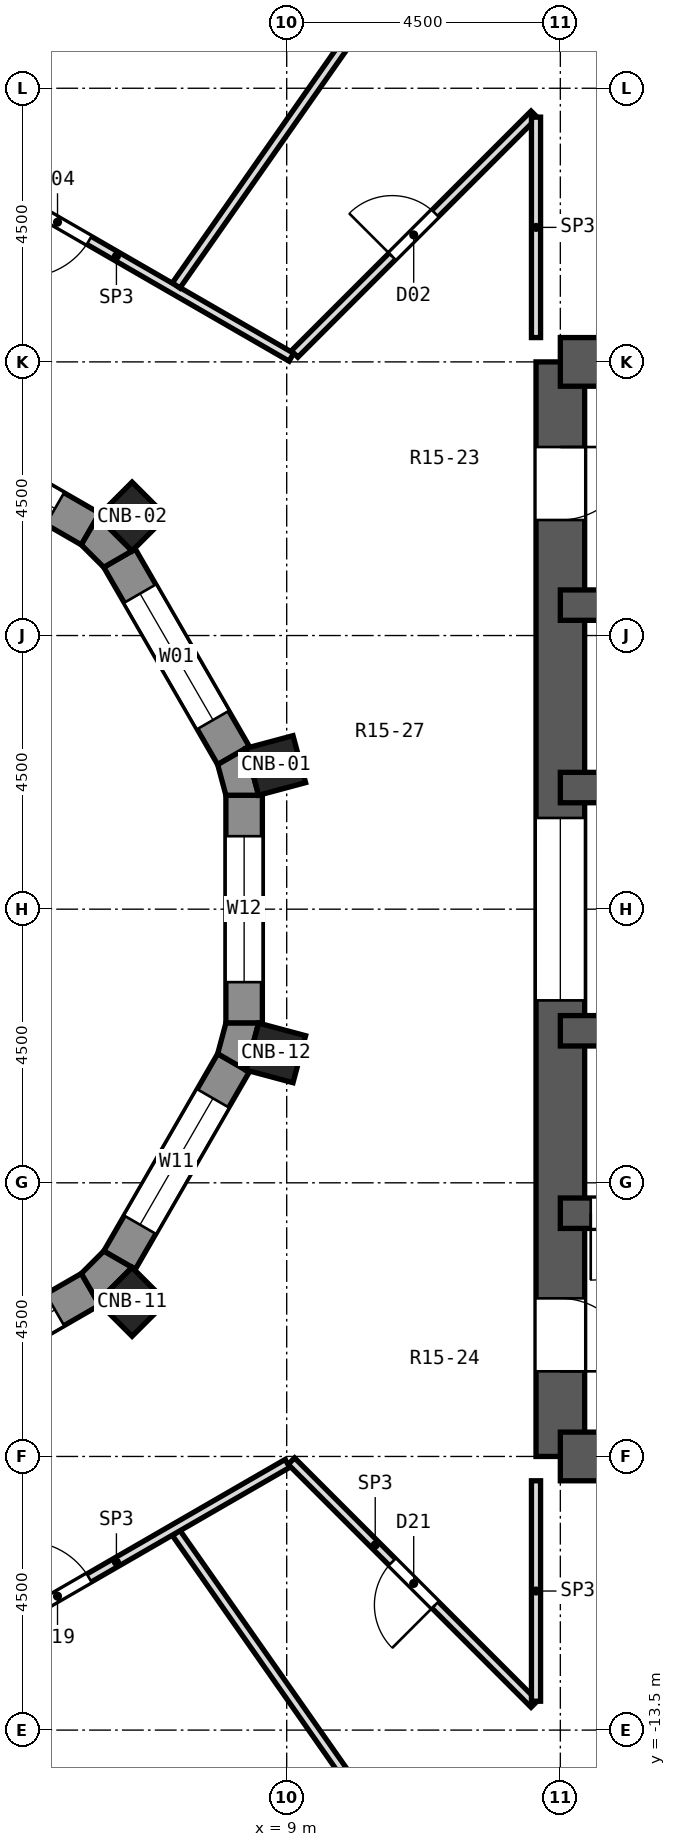
"""IFC4 building model, lengths in metres.
Left out: names, types, materials, properties, quantities, classifications, styles, units other than length and angle.
Written with IfcOpenShell. Run it as: python <this file> out.ifc"""

import sys

from ifc_helpers import new_model, si_unit, direction, frame, frame_2d, origin, origin_2d, place, context, subcontext, project, spatial, polyline, rectangle, outline, extrude, element, fill, save


model = new_model("IFC4")
c1 = context("Model", 3, precision=1e-05, world=origin(), true_north=direction((0.0, 1.0)))
c2 = subcontext(c1, "Body", "Model", "MODEL_VIEW")
j1 = project(units=[si_unit("LENGTHUNIT", "METRE"), si_unit("PLANEANGLEUNIT", "RADIAN")], contexts=[c1])
p1 = place(None, origin())
s1 = spatial("IfcSite", under=j1, at=p1, CompositionType="ELEMENT")
p2 = place(p1, origin())
s2 = spatial("IfcBuilding", under=s1, at=p2, CompositionType="ELEMENT")
p3 = place(p2, frame((0.0, 0.0, 82.4)))
s3 = spatial("IfcBuildingStorey", under=s2, at=p3, CompositionType="ELEMENT", Elevation=82.4)
for number, where, z_axis, x_axis in (
    (1, (8.821, 2.364, 0.0), (0.0, 0.0, 1.0), (0.966, 0.259, 0.0)),
    (2, (6.458, 6.458, 0.0), (0.0, 0.0, 1.0), (0.707, 0.707, 0.0)),
    (3, (6.458, -6.458, 0.0), (0.0, 0.0, 1.0), (0.707, -0.707, 0.0)),
    (4, (8.821, -2.364, 0.0), (0.0, 0.0, 1.0), (0.966, -0.259, 0.0)),
):
    element("IfcColumn", number, at=place(p3, frame(where, z_axis=z_axis, x_axis=x_axis)), inside=s3, PredefinedType="COLUMN", context=c2, shape_type="SweptSolid", body=[
        extrude(rectangle(XDim=0.8, YDim=0.8, at=origin_2d()), origin(), (0.0, 0.0, 1.0), 4.5),
    ])
p4 = place(p3, frame((13.5, -9.0, 0.0), z_axis=(0.0, 0.0, 1.0), x_axis=(0.0, 1.0, 0.0)))
e5 = element("IfcWall", 5, at=p4, inside=s3, PredefinedType="SHEAR", context=c2, shape_type="SweptSolid", body=[
    extrude(rectangle(XDim=18.0, YDim=0.8, at=frame_2d((9.0, 0.0))), origin(), (0.0, 0.0, 1.0), 4.5),
])
p5 = place(p4, frame((15.4, 0.0, 0.0)))
e6 = element("IfcOpeningElement", 6, at=p5, cuts=e5, PredefinedType="OPENING", context=c2, shape_type="SweptSolid", body=[
    extrude(rectangle(XDim=1.2, YDim=2.1, at=frame_2d((0.6, 1.05))), frame((0.0, 0.412, 0.0), z_axis=(0.0, -1.0, 0.0), x_axis=(1.0, 0.0, 0.0)), (0.0, 0.0, 1.0), 0.824),
])
p6 = place(p4, frame((1.4, 0.0, 0.0)))
e7 = element("IfcOpeningElement", 7, at=p6, cuts=e5, PredefinedType="OPENING", context=c2, shape_type="SweptSolid", body=[
    extrude(rectangle(XDim=1.2, YDim=2.1, at=frame_2d((0.6, 1.05))), frame((0.0, 0.412, 0.0), z_axis=(0.0, -1.0, 0.0), x_axis=(1.0, 0.0, 0.0)), (0.0, 0.0, 1.0), 0.824),
])
p7 = place(p4, frame((7.5, 0.0, 0.0)))
e8 = element("IfcOpeningElement", 8, at=p7, cuts=e5, PredefinedType="OPENING", context=c2, shape_type="SweptSolid", body=[
    extrude(rectangle(XDim=3.0, YDim=2.4, at=frame_2d((1.5, 1.2))), frame((0.0, 0.412, 0.0), z_axis=(0.0, -1.0, 0.0), x_axis=(1.0, 0.0, 0.0)), (0.0, 0.0, 1.0), 0.824),
])
for number, where, z_axis, x_axis in (
    (9, (13.5, 9.0, 0.0), (0.0, 0.0, 1.0), (1.0, 0.0, 0.0)),
    (10, (13.5, -9.0, 0.0), (0.0, 0.0, 1.0), (1.0, 0.0, 0.0)),
):
    element("IfcWall", number, at=place(p3, frame(where, z_axis=z_axis, x_axis=x_axis)), inside=s3, PredefinedType="SHEAR", context=c2, shape_type="SweptSolid", body=[
        extrude(rectangle(XDim=10.4, YDim=0.8, at=frame_2d((5.2, 0.0))), origin(), (0.0, 0.0, 1.0), 4.5),
    ])
p8 = place(p3, frame((13.5, 5.0, 0.0), z_axis=(0.0, 0.0, 1.0), x_axis=(1.0, 0.0, 0.0)))
e11 = element("IfcWall", 11, at=p8, inside=s3, PredefinedType="SHEAR", context=c2, shape_type="SweptSolid", body=[
    extrude(rectangle(XDim=10.4, YDim=0.5, at=frame_2d((5.2, 0.0))), origin(), (0.0, 0.0, 1.0), 4.5),
])
p9 = place(p3, frame((13.5, -5.0, 0.0), z_axis=(0.0, 0.0, 1.0), x_axis=(1.0, 0.0, 0.0)))
e12 = element("IfcWall", 12, at=p9, inside=s3, PredefinedType="SHEAR", context=c2, shape_type="SweptSolid", body=[
    extrude(rectangle(XDim=10.4, YDim=0.5, at=frame_2d((5.2, 0.0))), origin(), (0.0, 0.0, 1.0), 4.5),
])
p10 = place(p9, frame((0.5, 0.0, 0.0)))
e13 = element("IfcOpeningElement", 13, at=p10, cuts=e12, PredefinedType="OPENING", context=c2, shape_type="SweptSolid", body=[
    extrude(rectangle(XDim=1.1, YDim=2.1, at=frame_2d((0.55, 1.05))), frame((0.0, 0.262, 0.0), z_axis=(0.0, -1.0, 0.0), x_axis=(1.0, 0.0, 0.0)), (0.0, 0.0, 1.0), 0.524),
])
p11 = place(p3, frame((13.5, 2.0, 0.0), z_axis=(0.0, 0.0, 1.0), x_axis=(1.0, 0.0, 0.0)))
e14 = element("IfcWall", 14, at=p11, inside=s3, PredefinedType="SHEAR", context=c2, shape_type="SweptSolid", body=[
    extrude(rectangle(XDim=10.4, YDim=0.5, at=frame_2d((5.2, 0.0))), origin(), (0.0, 0.0, 1.0), 4.5),
])
p12 = place(p11, frame((7.65, 0.0, 0.0)))
e15 = element("IfcOpeningElement", 15, at=p12, cuts=e14, PredefinedType="OPENING", context=c2, shape_type="SweptSolid", body=[
    extrude(rectangle(XDim=1.1, YDim=2.1, at=frame_2d((0.55, 1.05))), frame((0.0, 0.262, 0.0), z_axis=(0.0, -1.0, 0.0), x_axis=(1.0, 0.0, 0.0)), (0.0, 0.0, 1.0), 0.524),
])
p13 = place(p11, frame((1.511, 0.0, 0.0)))
e16 = element("IfcOpeningElement", 16, at=p13, cuts=e14, PredefinedType="OPENING", context=c2, shape_type="SweptSolid", body=[
    extrude(rectangle(XDim=0.9, YDim=2.1, at=frame_2d((0.45, 1.05))), frame((0.0, 0.262, 0.0), z_axis=(0.0, -1.0, 0.0), x_axis=(1.0, 0.0, 0.0)), (0.0, 0.0, 1.0), 0.524),
])
p14 = place(p11, frame((3.841, 0.0, 0.0)))
e17 = element("IfcOpeningElement", 17, at=p14, cuts=e14, PredefinedType="OPENING", context=c2, shape_type="SweptSolid", body=[
    extrude(rectangle(XDim=0.9, YDim=2.1, at=frame_2d((0.45, 1.05))), frame((0.0, 0.262, 0.0), z_axis=(0.0, -1.0, 0.0), x_axis=(1.0, 0.0, 0.0)), (0.0, 0.0, 1.0), 0.524),
])
p15 = place(p3, frame((13.5, -2.0, 0.0), z_axis=(0.0, 0.0, 1.0), x_axis=(1.0, 0.0, 0.0)))
e18 = element("IfcWall", 18, at=p15, inside=s3, PredefinedType="SHEAR", context=c2, shape_type="SweptSolid", body=[
    extrude(rectangle(XDim=10.4, YDim=0.5, at=frame_2d((5.2, 0.0))), origin(), (0.0, 0.0, 1.0), 4.5),
])
p16 = place(p15, frame((5.62, 0.0, 0.0)))
e19 = element("IfcOpeningElement", 19, at=p16, cuts=e18, PredefinedType="OPENING", context=c2, shape_type="SweptSolid", body=[
    extrude(rectangle(XDim=1.1, YDim=2.1, at=frame_2d((0.55, 1.05))), frame((0.0, 0.262, 0.0), z_axis=(0.0, -1.0, 0.0), x_axis=(1.0, 0.0, 0.0)), (0.0, 0.0, 1.0), 0.524),
])
p17 = place(p15, frame((7.65, 0.0, 0.0)))
e20 = element("IfcOpeningElement", 20, at=p17, cuts=e18, PredefinedType="OPENING", context=c2, shape_type="SweptSolid", body=[
    extrude(rectangle(XDim=1.1, YDim=2.1, at=frame_2d((0.55, 1.05))), frame((0.0, 0.262, 0.0), z_axis=(0.0, -1.0, 0.0), x_axis=(1.0, 0.0, 0.0)), (0.0, 0.0, 1.0), 0.524),
])
p18 = place(p15, frame((1.215, 0.0, 0.0)))
e21 = element("IfcOpeningElement", 21, at=p18, cuts=e18, PredefinedType="OPENING", context=c2, shape_type="SweptSolid", body=[
    extrude(rectangle(XDim=1.0, YDim=2.1, at=frame_2d((0.5, 1.05))), frame((0.0, 0.262, 0.0), z_axis=(0.0, -1.0, 0.0), x_axis=(1.0, 0.0, 0.0)), (0.0, 0.0, 1.0), 0.524),
])
p19 = place(p3, frame((8.125, 2.527, 0.0), z_axis=(0.0, 0.0, 1.0), x_axis=(-0.499964958637, 0.86604563398, 0.0)))
e22 = element("IfcWall", 22, at=p19, inside=s3, PredefinedType="SOLIDWALL", context=c2, shape_type="SweptSolid", body=[
    extrude(rectangle(XDim=3.747, YDim=0.6, at=frame_2d((1.874, 0.0))), origin(), (0.0, 0.0, 1.0), 3.95),
])
p20 = place(p19, frame((0.674, 0.0, 1.5)))
e23 = element("IfcOpeningElement", 23, at=p20, cuts=e22, PredefinedType="OPENING", context=c2, shape_type="SweptSolid", body=[
    extrude(rectangle(XDim=2.4, YDim=2.0, at=frame_2d((1.2, 1.0))), frame((0.0, 0.312, 0.0), z_axis=(0.0, -1.0, 0.0), x_axis=(1.0, 0.0, 0.0)), (0.0, 0.0, 1.0), 0.624),
])
p21 = place(p3, frame((5.773, 6.251, 0.0), z_axis=(0.0, 0.0, 1.0), x_axis=(-0.86604563398, 0.499964958637, 0.0)))
e24 = element("IfcWall", 24, at=p21, inside=s3, PredefinedType="SOLIDWALL", context=c2, shape_type="SweptSolid", body=[
    extrude(rectangle(XDim=3.747, YDim=0.6, at=frame_2d((1.874, 0.0))), origin(), (0.0, 0.0, 1.0), 3.95),
])
p22 = place(p21, frame((0.674, 0.0, 1.5)))
e25 = element("IfcOpeningElement", 25, at=p22, cuts=e24, PredefinedType="OPENING", context=c2, shape_type="SweptSolid", body=[
    extrude(rectangle(XDim=2.4, YDim=2.0, at=frame_2d((1.2, 1.0))), frame((0.0, 0.312, 0.0), z_axis=(0.0, -1.0, 0.0), x_axis=(1.0, 0.0, 0.0)), (0.0, 0.0, 1.0), 0.624),
])
p23 = place(p3, frame((2.527, -8.125, 0.0), z_axis=(0.0, 0.0, 1.0), x_axis=(0.86604563398, 0.499964958637, 0.0)))
e26 = element("IfcWall", 26, at=p23, inside=s3, PredefinedType="SOLIDWALL", context=c2, shape_type="SweptSolid", body=[
    extrude(rectangle(XDim=3.747, YDim=0.6, at=frame_2d((1.874, 0.0))), origin(), (0.0, 0.0, 1.0), 3.95),
])
p24 = place(p23, frame((0.674, 0.0, 1.5)))
e27 = element("IfcOpeningElement", 27, at=p24, cuts=e26, PredefinedType="OPENING", context=c2, shape_type="SweptSolid", body=[
    extrude(rectangle(XDim=2.4, YDim=2.0, at=frame_2d((1.2, 1.0))), frame((0.0, 0.312, 0.0), z_axis=(0.0, -1.0, 0.0), x_axis=(1.0, 0.0, 0.0)), (0.0, 0.0, 1.0), 0.624),
])
p25 = place(p3, frame((6.251, -5.773, 0.0), z_axis=(0.0, 0.0, 1.0), x_axis=(0.499964958637, 0.86604563398, 0.0)))
e28 = element("IfcWall", 28, at=p25, inside=s3, PredefinedType="SOLIDWALL", context=c2, shape_type="SweptSolid", body=[
    extrude(rectangle(XDim=3.747, YDim=0.6, at=frame_2d((1.874, 0.0))), origin(), (0.0, 0.0, 1.0), 3.95),
])
p26 = place(p25, frame((0.674, 0.0, 1.5)))
e29 = element("IfcOpeningElement", 29, at=p26, cuts=e28, PredefinedType="OPENING", context=c2, shape_type="SweptSolid", body=[
    extrude(rectangle(XDim=2.4, YDim=2.0, at=frame_2d((1.2, 1.0))), frame((0.0, 0.312, 0.0), z_axis=(0.0, -1.0, 0.0), x_axis=(1.0, 0.0, 0.0)), (0.0, 0.0, 1.0), 0.624),
])
p27 = place(p3, frame((8.3, -1.874, 0.0), z_axis=(0.0, 0.0, 1.0), x_axis=(0.0, 1.0, 0.0)))
e30 = element("IfcWall", 30, at=p27, inside=s3, PredefinedType="SOLIDWALL", context=c2, shape_type="SweptSolid", body=[
    extrude(rectangle(XDim=3.748, YDim=0.6, at=frame_2d((1.874, 0.0))), origin(), (0.0, 0.0, 1.0), 3.95),
])
p28 = place(p27, frame((0.674, 0.0, 1.5)))
e31 = element("IfcOpeningElement", 31, at=p28, cuts=e30, PredefinedType="OPENING", context=c2, shape_type="SweptSolid", body=[
    extrude(rectangle(XDim=2.4, YDim=2.0, at=frame_2d((1.2, 1.0))), frame((0.0, 0.312, 0.0), z_axis=(0.0, -1.0, 0.0), x_axis=(1.0, 0.0, 0.0)), (0.0, 0.0, 1.0), 0.624),
])
p29 = place(p3, origin())
e32 = element("IfcWall", 32, at=p29, inside=s3, PredefinedType="SOLIDWALL", context=c2, shape_type="SweptSolid", body=[
    extrude(outline(polyline([(8.331, 2.646), (7.865, 2.377), (8.0, 1.874), (8.538, 1.874), (8.331, 2.646)])), origin(), (0.0, 0.0, 1.0), 3.95),
])
p30 = place(p3, origin())
e33 = element("IfcWall", 33, at=p30, inside=s3, PredefinedType="SOLIDWALL", context=c2, shape_type="SweptSolid", body=[
    extrude(outline(polyline([(5.892, 6.458), (5.623, 5.991), (5.991, 5.623), (6.458, 5.892), (5.892, 6.458)])), origin(), (0.0, 0.0, 1.0), 3.95),
])
p31 = place(p3, origin())
e34 = element("IfcWall", 34, at=p31, inside=s3, PredefinedType="SOLIDWALL", context=c2, shape_type="SweptSolid", body=[
    extrude(outline(polyline([(5.892, -6.458), (6.458, -5.892), (5.991, -5.623), (5.623, -5.991), (5.892, -6.458)])), origin(), (0.0, 0.0, 1.0), 3.95),
])
p32 = place(p3, origin())
e35 = element("IfcWall", 35, at=p32, inside=s3, PredefinedType="SOLIDWALL", context=c2, shape_type="SweptSolid", body=[
    extrude(outline(polyline([(8.538, -1.874), (8.0, -1.874), (7.865, -2.377), (8.331, -2.646), (8.538, -1.874)])), origin(), (0.0, 0.0, 1.0), 3.95),
])
p33 = place(p3, frame((3.323, -12.4, 0.0), z_axis=(0.0, 0.0, 1.0), x_axis=(0.258824952043, -0.96592424351, 0.0)))
e36 = element("IfcWall", 36, at=p33, inside=s3, PredefinedType="PARTITIONING", context=c2, shape_type="SweptSolid", body=[
    extrude(rectangle(XDim=12.862, YDim=0.15, at=frame_2d((6.431, 0.0))), origin(), (0.0, 0.0, 1.0), 3.95),
])
p34 = place(p3, frame((7.182, -10.258, 0.0), z_axis=(0.0, 0.0, 1.0), x_axis=(0.573601596314, -0.819134426518, 0.0)))
e37 = element("IfcWall", 37, at=p34, inside=s3, PredefinedType="PARTITIONING", context=c2, shape_type="SweptSolid", body=[
    extrude(rectangle(XDim=13.178, YDim=0.15, at=frame_2d((6.589, 0.0))), origin(), (0.0, 0.0, 1.0), 3.95),
])
p35 = place(p3, frame((9.077, -9.077, 0.0), z_axis=(0.0, 0.0, 1.0), x_axis=(0.707106781187, -0.707106781187, 0.0)))
e38 = element("IfcWall", 38, at=p35, inside=s3, PredefinedType="PARTITIONING", context=c2, shape_type="SweptSolid", body=[
    extrude(rectangle(XDim=5.65, YDim=0.15, at=frame_2d((2.825, 0.0))), origin(), (0.0, 0.0, 1.0), 3.95),
])
p36 = place(p35, frame((2.345, 0.0, 0.0)))
e39 = element("IfcOpeningElement", 39, at=p36, cuts=e38, PredefinedType="OPENING", context=c2, shape_type="SweptSolid", body=[
    extrude(rectangle(XDim=1.0, YDim=2.1, at=frame_2d((0.5, 1.05))), frame((0.0, 0.087, 0.0), z_axis=(0.0, -1.0, 0.0), x_axis=(1.0, 0.0, 0.0)), (0.0, 0.0, 1.0), 0.174),
])
p37 = place(p3, frame((3.323, 12.4, 0.0), z_axis=(0.0, 0.0, 1.0), x_axis=(0.865961614908, -0.500110469302, 0.0)))
e40 = element("IfcWall", 40, at=p37, inside=s3, PredefinedType="PARTITIONING", context=c2, shape_type="SweptSolid", body=[
    extrude(rectangle(XDim=6.645, YDim=0.15, at=frame_2d((3.322, 0.0))), origin(), (0.0, 0.0, 1.0), 3.95),
])
p38 = place(p37, frame((1.604, 0.0, 0.0)))
e41 = element("IfcOpeningElement", 41, at=p38, cuts=e40, PredefinedType="OPENING", context=c2, shape_type="SweptSolid", body=[
    extrude(rectangle(XDim=1.2, YDim=2.1, at=frame_2d((0.6, 1.05))), frame((0.0, 0.087, 0.0), z_axis=(0.0, -1.0, 0.0), x_axis=(1.0, 0.0, 0.0)), (0.0, 0.0, 1.0), 0.174),
])
p39 = place(p3, frame((3.388, -12.363, 0.0), z_axis=(0.0, 0.0, 1.0), x_axis=(0.865967095912, 0.5001009786, 0.0)))
e42 = element("IfcWall", 42, at=p39, inside=s3, PredefinedType="PARTITIONING", context=c2, shape_type="SweptSolid", body=[
    extrude(rectangle(XDim=6.495, YDim=0.15, at=frame_2d((3.248, 0.0))), origin(), (0.0, 0.0, 1.0), 3.95),
])
p40 = place(p39, frame((1.528, 0.0, 0.0)))
e43 = element("IfcOpeningElement", 43, at=p40, cuts=e42, PredefinedType="OPENING", context=c2, shape_type="SweptSolid", body=[
    extrude(rectangle(XDim=1.2, YDim=2.1, at=frame_2d((0.6, 1.05))), frame((0.0, 0.087, 0.0), z_axis=(0.0, -1.0, 0.0), x_axis=(1.0, 0.0, 0.0)), (0.0, 0.0, 1.0), 0.174),
])
p41 = place(p3, frame((9.13, 9.13, 0.0), z_axis=(0.0, 0.0, 1.0), x_axis=(0.707106781187, 0.707106781187, 0.0)))
e44 = element("IfcWall", 44, at=p41, inside=s3, PredefinedType="PARTITIONING", context=c2, shape_type="SweptSolid", body=[
    extrude(rectangle(XDim=5.575, YDim=0.15, at=frame_2d((2.787, 0.0))), origin(), (0.0, 0.0, 1.0), 3.95),
])
p42 = place(p41, frame((2.27, 0.0, 0.0)))
e45 = element("IfcOpeningElement", 45, at=p42, cuts=e44, PredefinedType="OPENING", context=c2, shape_type="SweptSolid", body=[
    extrude(rectangle(XDim=1.0, YDim=2.1, at=frame_2d((0.5, 1.05))), frame((0.0, 0.087, 0.0), z_axis=(0.0, -1.0, 0.0), x_axis=(1.0, 0.0, 0.0)), (0.0, 0.0, 1.0), 0.174),
])
p43 = place(p3, frame((7.182, 10.258, 0.0), z_axis=(0.0, 0.0, 1.0), x_axis=(0.573601596314, 0.819134426518, 0.0)))
e46 = element("IfcWall", 46, at=p43, inside=s3, PredefinedType="PARTITIONING", context=c2, shape_type="SweptSolid", body=[
    extrude(rectangle(XDim=13.178, YDim=0.15, at=frame_2d((6.589, 0.0))), origin(), (0.0, 0.0, 1.0), 3.95),
])
p44 = place(p3, frame((3.342, 12.472, 0.0), z_axis=(0.0, 0.0, 1.0), x_axis=(0.258835334672, 0.965921461365, 0.0)))
e47 = element("IfcWall", 47, at=p44, inside=s3, PredefinedType="PARTITIONING", context=c2, shape_type="SweptSolid", body=[
    extrude(rectangle(XDim=12.787, YDim=0.15, at=frame_2d((6.394, 0.0))), origin(), (0.0, 0.0, 1.0), 3.95),
])
for number, where, z_axis, x_axis in (
    (48, (13.1, -13.025, 0.0), (0.0, 0.0, 1.0), (0.0, 1.0, 0.0)),
    (49, (13.1, 9.4, 0.0), (0.0, 0.0, 1.0), (0.0, 1.0, 0.0)),
):
    element("IfcWall", number, at=place(p3, frame(where, z_axis=z_axis, x_axis=x_axis)), inside=s3, PredefinedType="PARTITIONING", context=c2, shape_type="SweptSolid", body=[
        extrude(rectangle(XDim=3.625, YDim=0.15, at=frame_2d((1.812, 0.0))), origin(), (0.0, 0.0, 1.0), 3.95),
    ])
p45 = place(p20, origin())
e50 = element("IfcWindow", 50, at=p45, inside=s3, PartitioningType="SINGLE_PANEL", PredefinedType="WINDOW", context=c2, shape_type="SweptSolid", body=[
    extrude(rectangle(XDim=2.4, YDim=2.0, at=frame_2d((1.2, 1.0))), frame((0.0, -0.12, 0.0), z_axis=(0.0, -1.0, 0.0), x_axis=(1.0, 0.0, 0.0)), (0.0, 0.0, 1.0), 0.06),
])
fill(e23, e50)
p46 = place(p22, origin())
e51 = element("IfcWindow", 51, at=p46, inside=s3, PartitioningType="SINGLE_PANEL", PredefinedType="WINDOW", context=c2, shape_type="SweptSolid", body=[
    extrude(rectangle(XDim=2.4, YDim=2.0, at=frame_2d((1.2, 1.0))), frame((0.0, -0.12, 0.0), z_axis=(0.0, -1.0, 0.0), x_axis=(1.0, 0.0, 0.0)), (0.0, 0.0, 1.0), 0.06),
])
fill(e25, e51)
p47 = place(p24, origin())
e52 = element("IfcWindow", 52, at=p47, inside=s3, PartitioningType="SINGLE_PANEL", PredefinedType="WINDOW", context=c2, shape_type="SweptSolid", body=[
    extrude(rectangle(XDim=2.4, YDim=2.0, at=frame_2d((1.2, 1.0))), frame((0.0, -0.12, 0.0), z_axis=(0.0, -1.0, 0.0), x_axis=(1.0, 0.0, 0.0)), (0.0, 0.0, 1.0), 0.06),
])
fill(e27, e52)
p48 = place(p26, origin())
e53 = element("IfcWindow", 53, at=p48, inside=s3, PartitioningType="SINGLE_PANEL", PredefinedType="WINDOW", context=c2, shape_type="SweptSolid", body=[
    extrude(rectangle(XDim=2.4, YDim=2.0, at=frame_2d((1.2, 1.0))), frame((0.0, -0.12, 0.0), z_axis=(0.0, -1.0, 0.0), x_axis=(1.0, 0.0, 0.0)), (0.0, 0.0, 1.0), 0.06),
])
fill(e29, e53)
p49 = place(p28, origin())
e54 = element("IfcWindow", 54, at=p49, inside=s3, PartitioningType="SINGLE_PANEL", PredefinedType="WINDOW", context=c2, shape_type="SweptSolid", body=[
    extrude(rectangle(XDim=2.4, YDim=2.0, at=frame_2d((1.2, 1.0))), frame((0.0, -0.12, 0.0), z_axis=(0.0, -1.0, 0.0), x_axis=(1.0, 0.0, 0.0)), (0.0, 0.0, 1.0), 0.06),
])
fill(e31, e54)
p50 = place(p42, origin())
e55 = element("IfcDoor", 55, at=p50, inside=s3, OperationType="SINGLE_SWING_LEFT", PredefinedType="DOOR", context=c2, shape_type="SweptSolid", body=[
    extrude(rectangle(XDim=1.0, YDim=2.1, at=frame_2d((0.5, 1.05))), frame((0.0, 0.025, 0.0), z_axis=(0.0, -1.0, 0.0), x_axis=(1.0, 0.0, 0.0)), (0.0, 0.0, 1.0), 0.05),
])
fill(e45, e55)
p51 = place(p38, frame((1.2, 0.0, 0.0), z_axis=(0.0, 0.0, 1.0), x_axis=(-1.0, 0.0, 0.0)))
e56 = element("IfcDoor", 56, at=p51, inside=s3, OperationType="SINGLE_SWING_RIGHT", PredefinedType="DOOR", context=c2, shape_type="SweptSolid", body=[
    extrude(rectangle(XDim=1.2, YDim=2.1, at=frame_2d((0.6, 1.05))), frame((0.0, 0.025, 0.0), z_axis=(0.0, -1.0, 0.0), x_axis=(1.0, 0.0, 0.0)), (0.0, 0.0, 1.0), 0.05),
])
fill(e41, e56)
p52 = place(p40, origin())
e57 = element("IfcDoor", 57, at=p52, inside=s3, OperationType="SINGLE_SWING_LEFT", PredefinedType="DOOR", context=c2, shape_type="SweptSolid", body=[
    extrude(rectangle(XDim=1.2, YDim=2.1, at=frame_2d((0.6, 1.05))), frame((0.0, 0.025, 0.0), z_axis=(0.0, -1.0, 0.0), x_axis=(1.0, 0.0, 0.0)), (0.0, 0.0, 1.0), 0.05),
])
fill(e43, e57)
p53 = place(p36, frame((1.0, 0.0, 0.0), z_axis=(0.0, 0.0, 1.0), x_axis=(-1.0, 0.0, 0.0)))
e58 = element("IfcDoor", 58, at=p53, inside=s3, OperationType="SINGLE_SWING_LEFT", PredefinedType="DOOR", context=c2, shape_type="SweptSolid", body=[
    extrude(rectangle(XDim=1.0, YDim=2.1, at=frame_2d((0.5, 1.05))), frame((0.0, 0.025, 0.0), z_axis=(0.0, -1.0, 0.0), x_axis=(1.0, 0.0, 0.0)), (0.0, 0.0, 1.0), 0.05),
])
fill(e39, e58)
p54 = place(p10, frame((1.1, 0.0, 0.0), z_axis=(0.0, 0.0, 1.0), x_axis=(-1.0, 0.0, 0.0)))
e59 = element("IfcDoor", 59, at=p54, inside=s3, OperationType="SINGLE_SWING_RIGHT", PredefinedType="DOOR", context=c2, shape_type="SweptSolid", body=[
    extrude(rectangle(XDim=1.1, YDim=2.1, at=frame_2d((0.55, 1.05))), frame((0.0, 0.025, 0.0), z_axis=(0.0, -1.0, 0.0), x_axis=(1.0, 0.0, 0.0)), (0.0, 0.0, 1.0), 0.05),
])
fill(e13, e59)
p55 = place(p5, frame((1.2, 0.0, 0.0), z_axis=(0.0, 0.0, 1.0), x_axis=(-1.0, 0.0, 0.0)))
e60 = element("IfcDoor", 60, at=p55, inside=s3, OperationType="SINGLE_SWING_LEFT", PredefinedType="DOOR", context=c2, shape_type="SweptSolid", body=[
    extrude(rectangle(XDim=1.2, YDim=2.1, at=frame_2d((0.6, 1.05))), frame((0.0, 0.025, 0.0), z_axis=(0.0, -1.0, 0.0), x_axis=(1.0, 0.0, 0.0)), (0.0, 0.0, 1.0), 0.05),
])
fill(e6, e60)
p56 = place(p6, frame((1.2, 0.0, 0.0), z_axis=(0.0, 0.0, 1.0), x_axis=(-1.0, 0.0, 0.0)))
e61 = element("IfcDoor", 61, at=p56, inside=s3, OperationType="SINGLE_SWING_RIGHT", PredefinedType="DOOR", context=c2, shape_type="SweptSolid", body=[
    extrude(rectangle(XDim=1.2, YDim=2.1, at=frame_2d((0.6, 1.05))), frame((0.0, 0.025, 0.0), z_axis=(0.0, -1.0, 0.0), x_axis=(1.0, 0.0, 0.0)), (0.0, 0.0, 1.0), 0.05),
])
fill(e7, e61)
p57 = place(p7, origin())
e62 = element("IfcDoor", 62, at=p57, inside=s3, OperationType="DOUBLE_DOOR_SLIDING", PredefinedType="DOOR", context=c2, shape_type="SweptSolid", body=[
    extrude(rectangle(XDim=3.0, YDim=2.4, at=frame_2d((1.5, 1.2))), frame((0.0, 0.025, 0.0), z_axis=(0.0, -1.0, 0.0), x_axis=(1.0, 0.0, 0.0)), (0.0, 0.0, 1.0), 0.05),
])
fill(e8, e62)
save(model, sys.argv[1])
